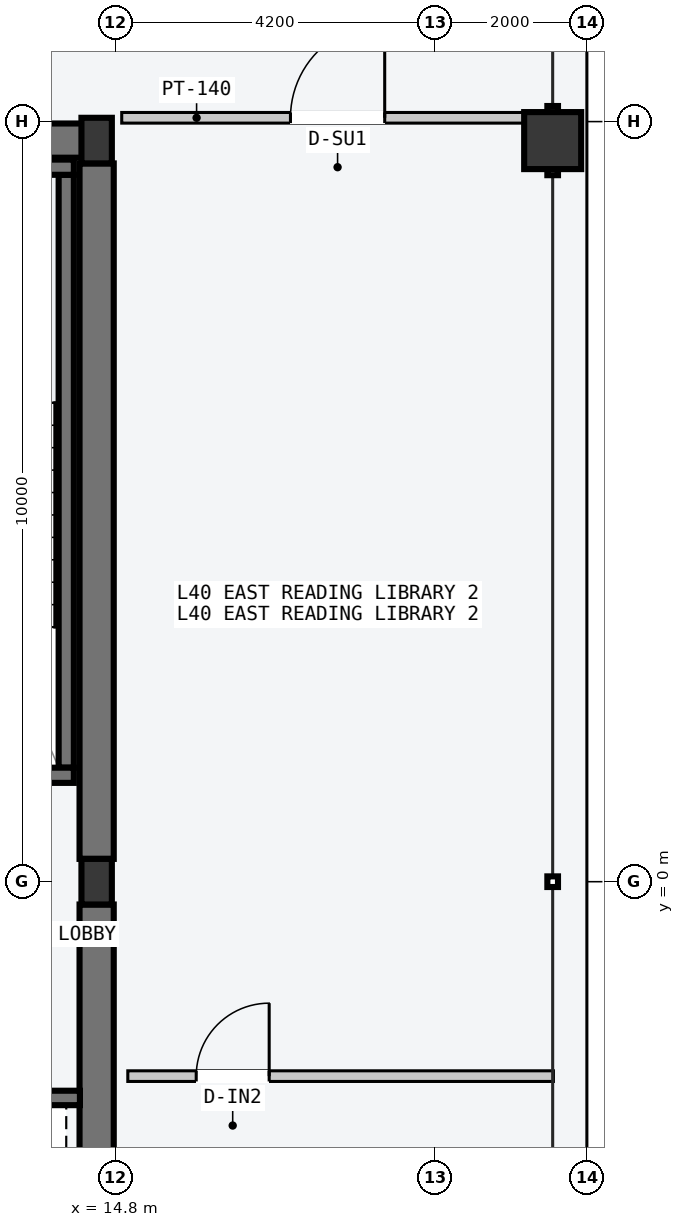
"""IFC4 building model, lengths in metres.
Left out: names, types, materials, properties, quantities, classifications, styles, units other than length and angle.
Written with IfcOpenShell. Run it as: python <this file> out.ifc"""

import sys

from ifc_helpers import new_model, si_unit, direction, frame, frame_2d, origin, origin_2d, place, context, subcontext, project, spatial, rectangle, hollow_rectangle, i_section, extrude, element, fill, save


model = new_model("IFC4")
c1 = context("Model", 3, precision=1e-05, world=origin(), true_north=direction((0.0, 1.0)))
c2 = subcontext(c1, "Body", "Model", "MODEL_VIEW")
j1 = project(units=[si_unit("LENGTHUNIT", "METRE"), si_unit("PLANEANGLEUNIT", "RADIAN")], contexts=[c1])
p1 = place(None, origin())
s1 = spatial("IfcSite", under=j1, at=p1, CompositionType="ELEMENT")
p2 = place(p1, origin())
s2 = spatial("IfcBuilding", under=s1, at=p2, CompositionType="ELEMENT")
p3 = place(p2, frame((0.0, 0.0, 155.1)))
s3 = spatial("IfcBuildingStorey", under=s2, at=p3, CompositionType="ELEMENT", Elevation=155.1)
p4 = place(p3, frame((8.07, 9.75, -0.2), z_axis=(0.0, 0.0, 1.0), x_axis=(1.0, 0.0, 0.0)))
e1 = element("IfcWall", 1, at=p4, inside=s3, PredefinedType="SHEAR", context=c2, shape_type="SweptSolid", body=[
    extrude(rectangle(XDim=6.46, YDim=0.45, at=frame_2d((3.23, 0.0))), origin(), (0.0, 0.0, 1.0), 3.6),
])
for number, where, z_axis, x_axis in (
    (2, (14.55, -9.45, -0.2), (0.0, 0.0, 1.0), (0.0, 1.0, 0.0)),
    (3, (14.55, 0.3, -0.2), (0.0, 0.0, 1.0), (0.0, 1.0, 0.0)),
):
    element("IfcWall", number, at=place(p3, frame(where, z_axis=z_axis, x_axis=x_axis)), inside=s3, PredefinedType="SHEAR", context=c2, shape_type="SweptSolid", body=[
        extrude(rectangle(XDim=9.15, YDim=0.45, at=frame_2d((4.575, 0.0))), origin(), (0.0, 0.0, 1.0), 3.6),
    ])
p5 = place(p3, frame((14.15, 1.5, -0.2), z_axis=(0.0, 0.0, 1.0), x_axis=(0.0, 1.0, 0.0)))
e4 = element("IfcWall", 4, at=p5, inside=s3, PredefinedType="SOLIDWALL", context=c2, shape_type="SweptSolid", body=[
    extrude(rectangle(XDim=7.8, YDim=0.2, at=frame_2d((3.9, 0.0))), origin(), (0.0, 0.0, 1.0), 3.6),
])
p6 = place(p3, frame((10.15, 1.4, -0.2), z_axis=(0.0, 0.0, 1.0), x_axis=(1.0, 0.0, 0.0)))
e5 = element("IfcWall", 5, at=p6, inside=s3, PredefinedType="SOLIDWALL", context=c2, shape_type="SweptSolid", body=[
    extrude(rectangle(XDim=4.1, YDim=0.2, at=frame_2d((2.05, 0.0))), origin(), (0.0, 0.0, 1.0), 3.6),
])
p7 = place(p6, frame((1.5, 0.0, 0.2)))
e6 = element("IfcOpeningElement", 6, at=p7, cuts=e5, PredefinedType="OPENING", context=c2, shape_type="SweptSolid", body=[
    extrude(rectangle(XDim=1.12, YDim=2.18, at=frame_2d((0.56, 1.09))), frame((0.0, 0.11, 0.0), z_axis=(0.0, -1.0, 0.0), x_axis=(1.0, 0.0, 0.0)), (0.0, 0.0, 1.0), 0.22),
])
p8 = place(p3, frame((10.15, 9.4, -0.2), z_axis=(0.0, 0.0, 1.0), x_axis=(1.0, 0.0, 0.0)))
e7 = element("IfcWall", 7, at=p8, inside=s3, PredefinedType="SOLIDWALL", context=c2, shape_type="SweptSolid", body=[
    extrude(rectangle(XDim=4.1, YDim=0.2, at=frame_2d((2.05, 0.0))), origin(), (0.0, 0.0, 1.0), 3.6),
])
for number, where, z_axis, x_axis in (
    (8, (14.55, 0.0, 0.0), (0.0, 0.0, 1.0), (1.0, 0.0, 0.0)),
    (9, (14.55, 9.75, 0.0), (0.0, 0.0, 1.0), (1.0, 0.0, 0.0)),
):
    element("IfcColumn", number, at=place(p3, frame(where, z_axis=z_axis, x_axis=x_axis)), inside=s3, PredefinedType="COLUMN", context=c2, shape_type="SweptSolid", body=[
        extrude(i_section(OverallWidth=0.4, OverallDepth=0.6, WebThickness=0.022, FlangeThickness=0.036, at=origin_2d()), origin(), (0.0, 0.0, 1.0), 3.6),
    ])
p9 = place(p3, frame((20.55, 9.75, 0.0), z_axis=(0.0, 0.0, 1.0), x_axis=(0.0, 1.0, 0.0)))
e10 = element("IfcColumn", 10, at=p9, inside=s3, PredefinedType="COLUMN", context=c2, shape_type="SweptSolid", body=[
    extrude(hollow_rectangle(XDim=0.75, YDim=0.75, WallThickness=0.032, at=origin_2d()), origin(), (0.0, 0.0, 1.0), 3.6),
])
p10 = place(p3, frame((11.65, -2.845, -0.2), z_axis=(0.0, 0.0, 1.0), x_axis=(1.0, 0.0, 0.0)))
e11 = element("IfcWall", 11, at=p10, inside=s3, PredefinedType="SOLIDWALL", context=c2, shape_type="SweptSolid", body=[
    extrude(rectangle(XDim=2.68, YDim=0.19, at=frame_2d((1.34, 0.0))), origin(), (0.0, 0.0, 1.0), 3.6),
])
p11 = place(p10, frame((0.65, 0.0, 0.2)))
e12 = element("IfcOpeningElement", 12, at=p11, cuts=e11, PredefinedType="OPENING", context=c2, shape_type="SweptSolid", body=[
    extrude(rectangle(XDim=1.2, YDim=2.2, at=frame_2d((0.6, 1.1))), frame((0.0, 0.105, 0.0), z_axis=(0.0, -1.0, 0.0), x_axis=(1.0, 0.0, 0.0)), (0.0, 0.0, 1.0), 0.21),
])
p12 = place(p3, frame((14.88, 10.05, 0.0), z_axis=(0.0, 0.0, 1.0), x_axis=(1.0, 0.0, 0.0)))
e13 = element("IfcWall", 13, at=p12, inside=s3, PredefinedType="PARTITIONING", context=c2, shape_type="SweptSolid", body=[
    extrude(rectangle(XDim=5.68, YDim=0.14, at=frame_2d((2.84, 0.0))), origin(), (0.0, 0.0, 1.0), 3.4),
])
p13 = place(p12, frame((2.22, 0.0, 0.0)))
e14 = element("IfcOpeningElement", 14, at=p13, cuts=e13, PredefinedType="OPENING", context=c2, shape_type="SweptSolid", body=[
    extrude(rectangle(XDim=1.24, YDim=2.24, at=frame_2d((0.62, 1.12))), frame((0.0, 0.08, 0.0), z_axis=(0.0, -1.0, 0.0), x_axis=(1.0, 0.0, 0.0)), (0.0, 0.0, 1.0), 0.16),
])
p14 = place(p3, frame((14.96, -2.558, 0.0), z_axis=(0.0, 0.0, 1.0), x_axis=(1.0, 0.0, 0.0)))
e15 = element("IfcWall", 15, at=p14, inside=s3, PredefinedType="PARTITIONING", context=c2, shape_type="SweptSolid", body=[
    extrude(rectangle(XDim=5.6, YDim=0.14, at=frame_2d((2.8, 0.0))), origin(), (0.0, 0.0, 1.0), 3.4),
])
p15 = place(p14, frame((0.9, 0.0, 0.0)))
e16 = element("IfcOpeningElement", 16, at=p15, cuts=e15, PredefinedType="OPENING", context=c2, shape_type="SweptSolid", body=[
    extrude(rectangle(XDim=0.96, YDim=2.18, at=frame_2d((0.48, 1.09))), frame((0.0, 0.08, 0.0), z_axis=(0.0, -1.0, 0.0), x_axis=(1.0, 0.0, 0.0)), (0.0, 0.0, 1.0), 0.16),
])
p16 = place(p13, origin())
e17 = element("IfcDoor", 17, at=p16, inside=s3, OperationType="SINGLE_SWING_RIGHT", PredefinedType="DOOR", context=c2, shape_type="SweptSolid", body=[
    extrude(rectangle(XDim=1.24, YDim=2.24, at=frame_2d((0.62, 1.12))), frame((0.0, 0.025, 0.0), z_axis=(0.0, -1.0, 0.0), x_axis=(1.0, 0.0, 0.0)), (0.0, 0.0, 1.0), 0.05),
])
fill(e14, e17)
p17 = place(p15, origin())
e18 = element("IfcDoor", 18, at=p17, inside=s3, OperationType="SINGLE_SWING_RIGHT", PredefinedType="DOOR", context=c2, shape_type="SweptSolid", body=[
    extrude(rectangle(XDim=0.96, YDim=2.18, at=frame_2d((0.48, 1.09))), frame((0.0, 0.025, 0.0), z_axis=(0.0, -1.0, 0.0), x_axis=(1.0, 0.0, 0.0)), (0.0, 0.0, 1.0), 0.05),
])
fill(e16, e18)
save(model, sys.argv[1])
